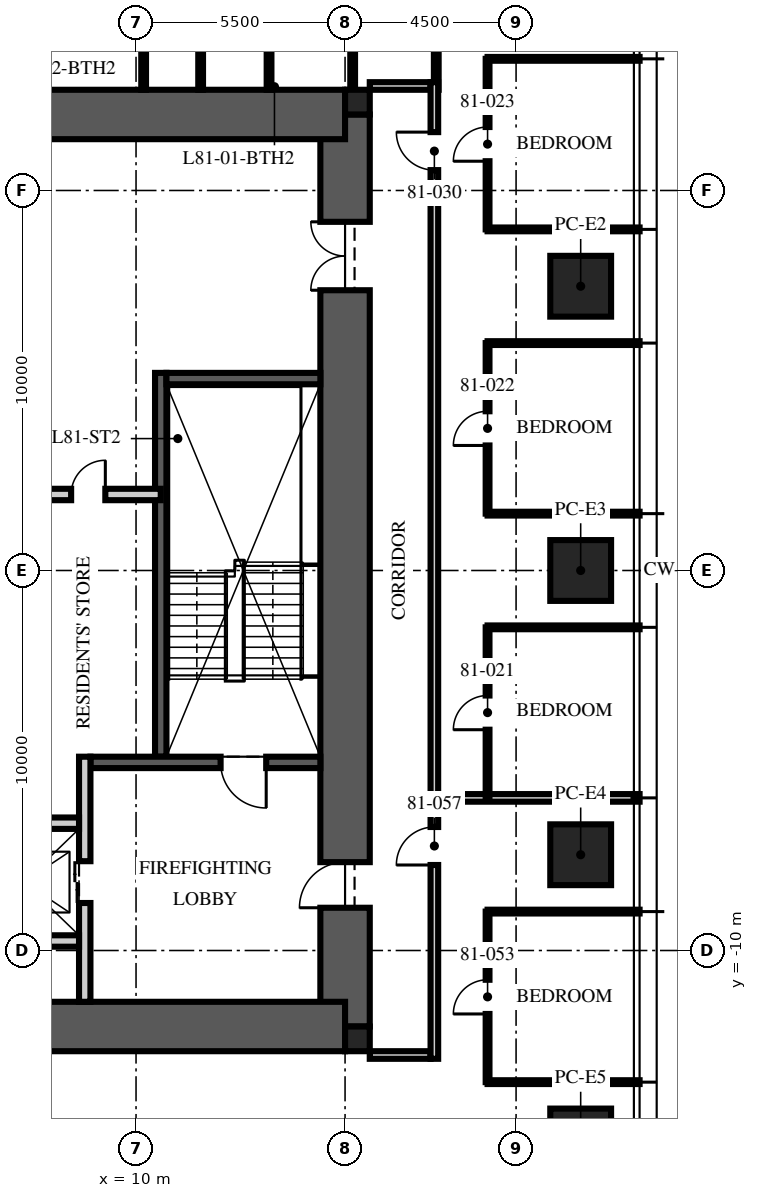
"""IFC4 building model, lengths in metres.
Left out: names, types, materials, properties, quantities, classifications, styles, units other than length and angle.
Written with IfcOpenShell. Run it as: python <this file> out.ifc"""

import sys

from ifc_helpers import new_model, si_unit, direction, frame, frame_2d, origin, origin_2d, place, context, subcontext, project, spatial, rectangle, extrude, element, fill, save


model = new_model("IFC4")
c1 = context("Model", 3, precision=1e-05, world=origin(), true_north=direction((0.0, 1.0)))
c2 = subcontext(c1, "Body", "Model", "MODEL_VIEW")
j1 = project(units=[si_unit("LENGTHUNIT", "METRE"), si_unit("PLANEANGLEUNIT", "RADIAN")], contexts=[c1])
p1 = place(None, origin())
s1 = spatial("IfcSite", under=j1, at=p1, CompositionType="ELEMENT")
p2 = place(p1, origin())
s2 = spatial("IfcBuilding", under=s1, at=p2, CompositionType="ELEMENT")
p3 = place(p2, frame((0.0, 0.0, 323.25)))
s3 = spatial("IfcBuildingStorey", under=s2, at=p3, CompositionType="ELEMENT", Elevation=323.25)
p4 = place(p3, frame((15.5, -12.0, -0.25), z_axis=(0.0, 0.0, 1.0), x_axis=(0.0, 1.0, 0.0)))
e1 = element("IfcWall", 1, at=p4, inside=s3, PredefinedType="SHEAR", context=c2, shape_type="SweptSolid", body=[
    extrude(rectangle(XDim=24.0, YDim=1.3, at=frame_2d((12.0, 0.0))), origin(), (0.0, 0.0, 1.0), 3.75),
])
p5 = place(p4, frame((3.125, 0.0, 0.25)))
e2 = element("IfcOpeningElement", 2, at=p5, cuts=e1, PredefinedType="OPENING", context=c2, shape_type="SweptSolid", body=[
    extrude(rectangle(XDim=1.2, YDim=2.1, at=frame_2d((0.6, 1.05))), frame((0.0, 0.66, 0.0), z_axis=(0.0, -1.0, 0.0), x_axis=(1.0, 0.0, 0.0)), (0.0, 0.0, 1.0), 1.32),
])
p6 = place(p4, frame((19.375, 0.0, 0.25)))
e3 = element("IfcOpeningElement", 3, at=p6, cuts=e1, PredefinedType="OPENING", context=c2, shape_type="SweptSolid", body=[
    extrude(rectangle(XDim=1.8, YDim=2.1, at=frame_2d((0.9, 1.05))), frame((0.0, 0.66, 0.0), z_axis=(0.0, -1.0, 0.0), x_axis=(1.0, 0.0, 0.0)), (0.0, 0.0, 1.0), 1.32),
])
for number, where, z_axis, x_axis in (
    (4, (-15.5, 12.0, -0.25), (0.0, 0.0, 1.0), (1.0, 0.0, 0.0)),
    (5, (-15.5, -12.0, -0.25), (0.0, 0.0, 1.0), (1.0, 0.0, 0.0)),
):
    element("IfcWall", number, at=place(p3, frame(where, z_axis=z_axis, x_axis=x_axis)), inside=s3, PredefinedType="SHEAR", context=c2, shape_type="SweptSolid", body=[
        extrude(rectangle(XDim=31.0, YDim=1.3, at=frame_2d((15.5, 0.0))), origin(), (0.0, 0.0, 1.0), 3.75),
    ])
for number, where, z_axis, x_axis in (
    (6, (15.825, 12.325, -0.25), (0.0, 0.0, 1.0), (1.0, 0.0, 0.0)),
    (7, (15.825, -12.325, -0.25), (0.0, 0.0, 1.0), (1.0, 0.0, 0.0)),
):
    element("IfcColumn", number, at=place(p3, frame(where, z_axis=z_axis, x_axis=x_axis)), inside=s3, PredefinedType="COLUMN", context=c2, shape_type="SweptSolid", body=[
        extrude(rectangle(XDim=0.65, YDim=0.65, at=origin_2d()), origin(), (0.0, 0.0, 1.0), 3.75),
    ])
for number, where, z_axis, x_axis in (
    (8, (21.7, 7.48, 0.0), (0.0, 0.0, 1.0), (0.0, 1.0, 0.0)),
    (9, (21.7, 0.0, 0.0), (0.0, 0.0, 1.0), (0.0, 1.0, 0.0)),
    (10, (21.7, -7.48, 0.0), (0.0, 0.0, 1.0), (0.0, 1.0, 0.0)),
    (11, (21.7, -14.96, 0.0), (0.0, 0.0, 1.0), (0.0, 1.0, 0.0)),
):
    element("IfcColumn", number, at=place(p3, frame(where, z_axis=z_axis, x_axis=x_axis)), inside=s3, PredefinedType="COLUMN", context=c2, shape_type="SweptSolid", body=[
        extrude(rectangle(XDim=1.6, YDim=1.6, at=origin_2d()), origin(), (0.0, 0.0, 1.0), 3.75),
    ])
p7 = place(p3, frame((10.65, -4.9, 0.0), z_axis=(0.0, 0.0, 1.0), x_axis=(0.0, 1.0, 0.0)))
e12 = element("IfcWall", 12, at=p7, inside=s3, PredefinedType="SOLIDWALL", context=c2, shape_type="SweptSolid", body=[
    extrude(rectangle(XDim=10.1, YDim=0.3, at=frame_2d((5.05, 0.0))), origin(), (0.0, 0.0, 1.0), 3.5),
])
p8 = place(p3, frame((14.85, -5.05, 0.0), z_axis=(0.0, 0.0, 1.0), x_axis=(-1.0, 0.0, 0.0)))
e13 = element("IfcWall", 13, at=p8, inside=s3, PredefinedType="SOLIDWALL", context=c2, shape_type="SweptSolid", body=[
    extrude(rectangle(XDim=6.05, YDim=0.3, at=frame_2d((3.025, 0.0))), origin(), (0.0, 0.0, 1.0), 3.5),
])
p9 = place(p8, frame((1.425, 0.0, 0.0)))
e14 = element("IfcOpeningElement", 14, at=p9, cuts=e13, PredefinedType="OPENING", context=c2, shape_type="SweptSolid", body=[
    extrude(rectangle(XDim=1.2, YDim=2.1, at=frame_2d((0.6, 1.05))), frame((0.0, 0.16, 0.0), z_axis=(0.0, -1.0, 0.0), x_axis=(1.0, 0.0, 0.0)), (0.0, 0.0, 1.0), 0.32),
])
p10 = place(p3, frame((14.85, 5.05, 0.0), z_axis=(0.0, 0.0, 1.0), x_axis=(-1.0, 0.0, 0.0)))
e15 = element("IfcWall", 15, at=p10, inside=s3, PredefinedType="SOLIDWALL", context=c2, shape_type="SweptSolid", body=[
    extrude(rectangle(XDim=4.05, YDim=0.3, at=frame_2d((2.025, 0.0))), origin(), (0.0, 0.0, 1.0), 3.5),
])
p11 = place(p3, frame((8.65, -11.35, 0.0), z_axis=(0.0, 0.0, 1.0), x_axis=(0.0, 1.0, 0.0)))
e16 = element("IfcWall", 16, at=p11, inside=s3, PredefinedType="PARTITIONING", context=c2, shape_type="SweptSolid", body=[
    extrude(rectangle(XDim=6.45, YDim=0.3, at=frame_2d((3.225, 0.0))), origin(), (0.0, 0.0, 1.0), 3.5),
])
p12 = place(p11, frame((2.6, 0.0, 0.0)))
e17 = element("IfcOpeningElement", 17, at=p12, cuts=e16, PredefinedType="OPENING", context=c2, shape_type="SweptSolid", body=[
    extrude(rectangle(XDim=1.1, YDim=2.1, at=frame_2d((0.55, 1.05))), frame((0.0, 0.16, 0.0), z_axis=(0.0, -1.0, 0.0), x_axis=(1.0, 0.0, 0.0)), (0.0, 0.0, 1.0), 0.32),
])
p13 = place(p3, frame((-8.5, -6.65, 0.0), z_axis=(0.0, 0.0, 1.0), x_axis=(1.0, 0.0, 0.0)))
e18 = element("IfcWall", 18, at=p13, inside=s3, PredefinedType="PARTITIONING", context=c2, shape_type="SweptSolid", body=[
    extrude(rectangle(XDim=17.0, YDim=0.3, at=frame_2d((8.5, 0.0))), origin(), (0.0, 0.0, 1.0), 3.5),
])
p14 = place(p13, frame((7.8, 0.0, 0.0)))
e19 = element("IfcOpeningElement", 19, at=p14, cuts=e18, PredefinedType="OPENING", context=c2, shape_type="SweptSolid", body=[
    extrude(rectangle(XDim=1.3, YDim=2.4, at=frame_2d((0.65, 1.2))), frame((0.0, 0.16, 0.0), z_axis=(0.0, -1.0, 0.0), x_axis=(1.0, 0.0, 0.0)), (0.0, 0.0, 1.0), 0.32),
])
p15 = place(p13, frame((5.65, 0.0, 0.0)))
e20 = element("IfcOpeningElement", 20, at=p15, cuts=e18, PredefinedType="OPENING", context=c2, shape_type="SweptSolid", body=[
    extrude(rectangle(XDim=0.9, YDim=2.1, at=frame_2d((0.45, 1.05))), frame((0.0, 0.16, 0.0), z_axis=(0.0, -1.0, 0.0), x_axis=(1.0, 0.0, 0.0)), (0.0, 0.0, 1.0), 0.32),
])
p16 = place(p13, frame((10.4, 0.0, 0.0)))
e21 = element("IfcOpeningElement", 21, at=p16, cuts=e18, PredefinedType="OPENING", context=c2, shape_type="SweptSolid", body=[
    extrude(rectangle(XDim=0.9, YDim=2.1, at=frame_2d((0.45, 1.05))), frame((0.0, 0.16, 0.0), z_axis=(0.0, -1.0, 0.0), x_axis=(1.0, 0.0, 0.0)), (0.0, 0.0, 1.0), 0.32),
])
p17 = place(p3, frame((5.6, -9.75, 0.0), z_axis=(0.0, 0.0, 1.0), x_axis=(1.0, 0.0, 0.0)))
e22 = element("IfcWall", 22, at=p17, inside=s3, PredefinedType="PARTITIONING", context=c2, shape_type="SweptSolid", body=[
    extrude(rectangle(XDim=2.9, YDim=0.3, at=frame_2d((1.45, 0.0))), origin(), (0.0, 0.0, 1.0), 3.5),
])
p18 = place(p3, frame((-10.65, 2.0, 0.0), z_axis=(0.0, 0.0, 1.0), x_axis=(1.0, 0.0, 0.0)))
e23 = element("IfcWall", 23, at=p18, inside=s3, PredefinedType="PARTITIONING", context=c2, shape_type="SweptSolid", body=[
    extrude(rectangle(XDim=21.3, YDim=0.3, at=frame_2d((10.65, 0.0))), origin(), (0.0, 0.0, 1.0), 3.5),
])
p19 = place(p18, frame((10.05, 0.0, 0.0)))
e24 = element("IfcOpeningElement", 24, at=p19, cuts=e23, PredefinedType="OPENING", context=c2, shape_type="SweptSolid", body=[
    extrude(rectangle(XDim=1.2, YDim=2.1, at=frame_2d((0.6, 1.05))), frame((0.0, 0.16, 0.0), z_axis=(0.0, -1.0, 0.0), x_axis=(1.0, 0.0, 0.0)), (0.0, 0.0, 1.0), 0.32),
])
p20 = place(p18, frame((18.942, 0.0, 0.0)))
e25 = element("IfcOpeningElement", 25, at=p20, cuts=e23, PredefinedType="OPENING", context=c2, shape_type="SweptSolid", body=[
    extrude(rectangle(XDim=0.9, YDim=2.1, at=frame_2d((0.45, 1.05))), frame((0.0, 0.16, 0.0), z_axis=(0.0, -1.0, 0.0), x_axis=(1.0, 0.0, 0.0)), (0.0, 0.0, 1.0), 0.32),
])
for number, where, z_axis, x_axis in (
    (26, (16.15, 12.75, 0.0), (0.0, 0.0, 1.0), (1.0, 0.0, 0.0)),
    (27, (16.15, -12.75, 0.0), (0.0, 0.0, 1.0), (1.0, 0.0, 0.0)),
):
    element("IfcWall", number, at=place(p3, frame(where, z_axis=z_axis, x_axis=x_axis)), inside=s3, PredefinedType="PARTITIONING", context=c2, shape_type="SweptSolid", body=[
        extrude(rectangle(XDim=1.6, YDim=0.2, at=frame_2d((0.8, 0.0))), origin(), (0.0, 0.0, 1.0), 2.6),
    ])
p21 = place(p3, frame((17.95, -5.984, 0.0), z_axis=(0.0, 0.0, 1.0), x_axis=(1.0, 0.0, 0.0)))
e28 = element("IfcWall", 28, at=p21, inside=s3, PredefinedType="PARTITIONING", context=c2, shape_type="SweptSolid", body=[
    extrude(rectangle(XDim=5.3, YDim=0.2, at=frame_2d((2.65, 0.0))), origin(), (0.0, 0.0, 1.0), 3.01),
])
for number, where, z_axis, x_axis in (
    (29, (19.25, -1.496, 0.0), (0.0, 0.0, 1.0), (1.0, 0.0, 0.0)),
    (30, (19.25, 1.496, 0.0), (0.0, 0.0, 1.0), (1.0, 0.0, 0.0)),
    (31, (19.25, 5.984, 0.0), (0.0, 0.0, 1.0), (1.0, 0.0, 0.0)),
    (32, (19.25, 8.976, 0.0), (0.0, 0.0, 1.0), (1.0, 0.0, 0.0)),
    (33, (19.25, 13.464, 0.0), (0.0, 0.0, 1.0), (1.0, 0.0, 0.0)),
    (34, (19.25, -13.464, 0.0), (0.0, 0.0, 1.0), (1.0, 0.0, 0.0)),
    (35, (19.25, -8.976, 0.0), (0.0, 0.0, 1.0), (1.0, 0.0, 0.0)),
):
    element("IfcWall", number, at=place(p3, frame(where, z_axis=z_axis, x_axis=x_axis)), inside=s3, PredefinedType="PARTITIONING", context=c2, shape_type="SweptSolid", body=[
        extrude(rectangle(XDim=4.0, YDim=0.1, at=frame_2d((2.0, 0.0))), origin(), (0.0, 0.0, 1.0), 3.01),
    ])
p22 = place(p3, frame((19.25, -5.984, 0.0), z_axis=(0.0, 0.0, 1.0), x_axis=(0.0, 1.0, 0.0)))
e36 = element("IfcWall", 36, at=p22, inside=s3, PredefinedType="PARTITIONING", context=c2, shape_type="SweptSolid", body=[
    extrude(rectangle(XDim=4.488, YDim=0.1, at=frame_2d((2.244, 0.0))), origin(), (0.0, 0.0, 1.0), 2.91),
])
p23 = place(p22, frame((1.794, 0.0, 0.0)))
e37 = element("IfcOpeningElement", 37, at=p23, cuts=e36, PredefinedType="OPENING", context=c2, shape_type="SweptSolid", body=[
    extrude(rectangle(XDim=0.9, YDim=2.1, at=frame_2d((0.45, 1.05))), frame((0.0, 0.06, 0.0), z_axis=(0.0, -1.0, 0.0), x_axis=(1.0, 0.0, 0.0)), (0.0, 0.0, 1.0), 0.12),
])
p24 = place(p3, frame((19.25, 1.496, 0.0), z_axis=(0.0, 0.0, 1.0), x_axis=(0.0, 1.0, 0.0)))
e38 = element("IfcWall", 38, at=p24, inside=s3, PredefinedType="PARTITIONING", context=c2, shape_type="SweptSolid", body=[
    extrude(rectangle(XDim=4.488, YDim=0.1, at=frame_2d((2.244, 0.0))), origin(), (0.0, 0.0, 1.0), 2.91),
])
p25 = place(p24, frame((1.794, 0.0, 0.0)))
e39 = element("IfcOpeningElement", 39, at=p25, cuts=e38, PredefinedType="OPENING", context=c2, shape_type="SweptSolid", body=[
    extrude(rectangle(XDim=0.9, YDim=2.1, at=frame_2d((0.45, 1.05))), frame((0.0, 0.06, 0.0), z_axis=(0.0, -1.0, 0.0), x_axis=(1.0, 0.0, 0.0)), (0.0, 0.0, 1.0), 0.12),
])
p26 = place(p3, frame((19.25, 8.976, 0.0), z_axis=(0.0, 0.0, 1.0), x_axis=(0.0, 1.0, 0.0)))
e40 = element("IfcWall", 40, at=p26, inside=s3, PredefinedType="PARTITIONING", context=c2, shape_type="SweptSolid", body=[
    extrude(rectangle(XDim=4.488, YDim=0.1, at=frame_2d((2.244, 0.0))), origin(), (0.0, 0.0, 1.0), 2.91),
])
p27 = place(p26, frame((1.794, 0.0, 0.0)))
e41 = element("IfcOpeningElement", 41, at=p27, cuts=e40, PredefinedType="OPENING", context=c2, shape_type="SweptSolid", body=[
    extrude(rectangle(XDim=0.9, YDim=2.1, at=frame_2d((0.45, 1.05))), frame((0.0, 0.06, 0.0), z_axis=(0.0, -1.0, 0.0), x_axis=(1.0, 0.0, 0.0)), (0.0, 0.0, 1.0), 0.12),
])
for number, where, z_axis, x_axis in (
    (42, (17.9, 12.65, 0.0), (0.0, 0.0, 1.0), (0.0, 1.0, 0.0)),
    (43, (15.7, 12.65, 0.0), (0.0, 0.0, 1.0), (0.0, 1.0, 0.0)),
):
    element("IfcWall", number, at=place(p3, frame(where, z_axis=z_axis, x_axis=x_axis)), inside=s3, PredefinedType="PARTITIONING", context=c2, shape_type="SweptSolid", body=[
        extrude(rectangle(XDim=3.846, YDim=0.125, at=frame_2d((1.923, 0.0))), origin(), (0.0, 0.0, 1.0), 2.6),
    ])
for number, where, z_axis, x_axis in (
    (44, (13.5, 12.65, 0.0), (0.0, 0.0, 1.0), (0.0, 1.0, 0.0)),
    (45, (11.7, 12.65, 0.0), (0.0, 0.0, 1.0), (0.0, 1.0, 0.0)),
    (46, (10.2, 12.65, 0.0), (0.0, 0.0, 1.0), (0.0, 1.0, 0.0)),
):
    element("IfcWall", number, at=place(p3, frame(where, z_axis=z_axis, x_axis=x_axis)), inside=s3, PredefinedType="PARTITIONING", context=c2, shape_type="SweptSolid", body=[
        extrude(rectangle(XDim=3.846, YDim=0.125, at=frame_2d((1.923, 0.0))), origin(), (0.0, 0.0, 1.0), 3.5),
    ])
p28 = place(p3, frame((19.25, -13.464, 0.0), z_axis=(0.0, 0.0, 1.0), x_axis=(0.0, 1.0, 0.0)))
e47 = element("IfcWall", 47, at=p28, inside=s3, PredefinedType="PARTITIONING", context=c2, shape_type="SweptSolid", body=[
    extrude(rectangle(XDim=4.488, YDim=0.1, at=frame_2d((2.244, 0.0))), origin(), (0.0, 0.0, 1.0), 2.91),
])
p29 = place(p28, frame((1.794, 0.0, 0.0)))
e48 = element("IfcOpeningElement", 48, at=p29, cuts=e47, PredefinedType="OPENING", context=c2, shape_type="SweptSolid", body=[
    extrude(rectangle(XDim=0.9, YDim=2.1, at=frame_2d((0.45, 1.05))), frame((0.0, 0.06, 0.0), z_axis=(0.0, -1.0, 0.0), x_axis=(1.0, 0.0, 0.0)), (0.0, 0.0, 1.0), 0.12),
])
p30 = place(p3, frame((17.85, -12.85, 0.0), z_axis=(0.0, 0.0, 1.0), x_axis=(0.0, 1.0, 0.0)))
e49 = element("IfcWall", 49, at=p30, inside=s3, PredefinedType="PARTITIONING", context=c2, shape_type="SweptSolid", body=[
    extrude(rectangle(XDim=25.7, YDim=0.2, at=frame_2d((12.85, 0.0))), origin(), (0.0, 0.0, 1.0), 2.9),
])
p31 = place(p30, frame((23.386, 0.0, 0.0)))
e50 = element("IfcOpeningElement", 50, at=p31, cuts=e49, PredefinedType="OPENING", context=c2, shape_type="SweptSolid", body=[
    extrude(rectangle(XDim=1.0, YDim=2.2, at=frame_2d((0.5, 1.1))), frame((0.0, 0.11, 0.0), z_axis=(0.0, -1.0, 0.0), x_axis=(1.0, 0.0, 0.0)), (0.0, 0.0, 1.0), 0.22),
])
p32 = place(p30, frame((5.1, 0.0, 0.0)))
e51 = element("IfcOpeningElement", 51, at=p32, cuts=e49, PredefinedType="OPENING", context=c2, shape_type="SweptSolid", body=[
    extrude(rectangle(XDim=1.0, YDim=2.2, at=frame_2d((0.5, 1.1))), frame((0.0, 0.11, 0.0), z_axis=(0.0, -1.0, 0.0), x_axis=(1.0, 0.0, 0.0)), (0.0, 0.0, 1.0), 0.22),
])
p33 = place(p9, origin())
e52 = element("IfcDoor", 52, at=p33, inside=s3, OperationType="SINGLE_SWING_LEFT", PredefinedType="DOOR", context=c2, shape_type="SweptSolid", body=[
    extrude(rectangle(XDim=1.2, YDim=2.1, at=frame_2d((0.6, 1.05))), frame((0.0, 0.025, 0.0), z_axis=(0.0, -1.0, 0.0), x_axis=(1.0, 0.0, 0.0)), (0.0, 0.0, 1.0), 0.05),
])
fill(e14, e52)
p34 = place(p5, origin())
e53 = element("IfcDoor", 53, at=p34, inside=s3, OperationType="SINGLE_SWING_LEFT", PredefinedType="DOOR", context=c2, shape_type="SweptSolid", body=[
    extrude(rectangle(XDim=1.2, YDim=2.1, at=frame_2d((0.6, 1.05))), frame((0.0, 0.025, 0.0), z_axis=(0.0, -1.0, 0.0), x_axis=(1.0, 0.0, 0.0)), (0.0, 0.0, 1.0), 0.05),
])
fill(e2, e53)
p35 = place(p6, origin())
e54 = element("IfcDoor", 54, at=p35, inside=s3, OperationType="DOUBLE_DOOR_SINGLE_SWING", PredefinedType="DOOR", context=c2, shape_type="SweptSolid", body=[
    extrude(rectangle(XDim=1.8, YDim=2.1, at=frame_2d((0.9, 1.05))), frame((0.0, 0.025, 0.0), z_axis=(0.0, -1.0, 0.0), x_axis=(1.0, 0.0, 0.0)), (0.0, 0.0, 1.0), 0.05),
])
fill(e3, e54)
p36 = place(p12, origin())
e55 = element("IfcDoor", 55, at=p36, inside=s3, OperationType="DOUBLE_DOOR_SLIDING", PredefinedType="DOOR", context=c2, shape_type="SweptSolid", body=[
    extrude(rectangle(XDim=1.1, YDim=2.1, at=frame_2d((0.55, 1.05))), frame((0.0, 0.025, 0.0), z_axis=(0.0, -1.0, 0.0), x_axis=(1.0, 0.0, 0.0)), (0.0, 0.0, 1.0), 0.05),
])
fill(e17, e55)
p37 = place(p20, origin())
e56 = element("IfcDoor", 56, at=p37, inside=s3, OperationType="SINGLE_SWING_RIGHT", PredefinedType="DOOR", context=c2, shape_type="SweptSolid", body=[
    extrude(rectangle(XDim=0.9, YDim=2.1, at=frame_2d((0.45, 1.05))), frame((0.0, 0.025, 0.0), z_axis=(0.0, -1.0, 0.0), x_axis=(1.0, 0.0, 0.0)), (0.0, 0.0, 1.0), 0.05),
])
fill(e25, e56)
p38 = place(p23, origin())
e57 = element("IfcDoor", 57, at=p38, inside=s3, OperationType="SINGLE_SWING_LEFT", PredefinedType="DOOR", context=c2, shape_type="SweptSolid", body=[
    extrude(rectangle(XDim=0.9, YDim=2.1, at=frame_2d((0.45, 1.05))), frame((0.0, 0.025, 0.0), z_axis=(0.0, -1.0, 0.0), x_axis=(1.0, 0.0, 0.0)), (0.0, 0.0, 1.0), 0.05),
])
fill(e37, e57)
p39 = place(p25, origin())
e58 = element("IfcDoor", 58, at=p39, inside=s3, OperationType="SINGLE_SWING_LEFT", PredefinedType="DOOR", context=c2, shape_type="SweptSolid", body=[
    extrude(rectangle(XDim=0.9, YDim=2.1, at=frame_2d((0.45, 1.05))), frame((0.0, 0.025, 0.0), z_axis=(0.0, -1.0, 0.0), x_axis=(1.0, 0.0, 0.0)), (0.0, 0.0, 1.0), 0.05),
])
fill(e39, e58)
p40 = place(p27, origin())
e59 = element("IfcDoor", 59, at=p40, inside=s3, OperationType="SINGLE_SWING_LEFT", PredefinedType="DOOR", context=c2, shape_type="SweptSolid", body=[
    extrude(rectangle(XDim=0.9, YDim=2.1, at=frame_2d((0.45, 1.05))), frame((0.0, 0.025, 0.0), z_axis=(0.0, -1.0, 0.0), x_axis=(1.0, 0.0, 0.0)), (0.0, 0.0, 1.0), 0.05),
])
fill(e41, e59)
p41 = place(p31, origin())
e60 = element("IfcDoor", 60, at=p41, inside=s3, OperationType="SINGLE_SWING_RIGHT", PredefinedType="DOOR", context=c2, shape_type="SweptSolid", body=[
    extrude(rectangle(XDim=1.0, YDim=2.2, at=frame_2d((0.5, 1.1))), frame((0.0, 0.025, 0.0), z_axis=(0.0, -1.0, 0.0), x_axis=(1.0, 0.0, 0.0)), (0.0, 0.0, 1.0), 0.05),
])
fill(e50, e60)
p42 = place(p29, origin())
e61 = element("IfcDoor", 61, at=p42, inside=s3, OperationType="SINGLE_SWING_LEFT", PredefinedType="DOOR", context=c2, shape_type="SweptSolid", body=[
    extrude(rectangle(XDim=0.9, YDim=2.1, at=frame_2d((0.45, 1.05))), frame((0.0, 0.025, 0.0), z_axis=(0.0, -1.0, 0.0), x_axis=(1.0, 0.0, 0.0)), (0.0, 0.0, 1.0), 0.05),
])
fill(e48, e61)
p43 = place(p32, origin())
e62 = element("IfcDoor", 62, at=p43, inside=s3, OperationType="SINGLE_SWING_LEFT", PredefinedType="DOOR", context=c2, shape_type="SweptSolid", body=[
    extrude(rectangle(XDim=1.0, YDim=2.2, at=frame_2d((0.5, 1.1))), frame((0.0, 0.025, 0.0), z_axis=(0.0, -1.0, 0.0), x_axis=(1.0, 0.0, 0.0)), (0.0, 0.0, 1.0), 0.05),
])
fill(e51, e62)
save(model, sys.argv[1])
